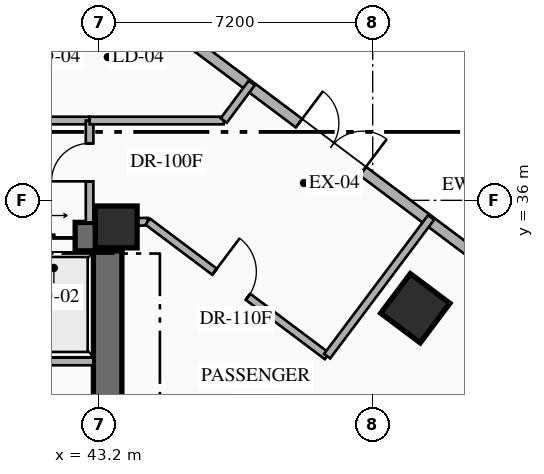
"""IFC4 building model, lengths in metres.
Left out: names, types, materials, properties, quantities, classifications, styles, units other than length and angle.
Written with IfcOpenShell. Run it as: python <this file> out.ifc"""

import sys

from ifc_helpers import new_model, si_unit, direction, frame, frame_2d, origin, origin_2d, place, context, subcontext, project, spatial, rectangle, extrude, element, fill, save


model = new_model("IFC4")
c1 = context("Model", 3, precision=1e-05, world=origin(), true_north=direction((0.0, 1.0)))
c2 = subcontext(c1, "Body", "Model", "MODEL_VIEW")
j1 = project(units=[si_unit("LENGTHUNIT", "METRE"), si_unit("PLANEANGLEUNIT", "RADIAN")], contexts=[c1])
p1 = place(None, origin())
s1 = spatial("IfcSite", under=j1, at=p1, CompositionType="ELEMENT")
p2 = place(p1, origin())
s2 = spatial("IfcBuilding", under=s1, at=p2, CompositionType="ELEMENT")
p3 = place(p2, origin())
s3 = spatial("IfcBuildingStorey", under=s2, at=p3, CompositionType="ELEMENT", Elevation=0.0)
p4 = place(p3, frame((35.74, 35.045, 0.0), z_axis=(0.0, 0.0, 1.0), x_axis=(1.0, 0.0, 0.0)))
e1 = element("IfcWall", 1, at=p4, inside=s3, PredefinedType="SHEAR", context=c2, shape_type="SweptSolid", body=[
    extrude(rectangle(XDim=8.06, YDim=0.75, at=frame_2d((4.03, 0.0))), origin(), (0.0, 0.0, 1.0), 5.4),
])
p5 = place(p4, frame((2.81, 0.0, 0.0)))
e2 = element("IfcOpeningElement", 2, at=p5, cuts=e1, PredefinedType="OPENING", context=c2, shape_type="SweptSolid", body=[
    extrude(rectangle(XDim=1.1, YDim=2.2, at=frame_2d((0.55, 1.1))), frame((0.0, 0.385, 0.0), z_axis=(0.0, -1.0, 0.0), x_axis=(1.0, 0.0, 0.0)), (0.0, 0.0, 1.0), 0.77),
])
p6 = place(p4, frame((5.71, 0.0, 0.0)))
e3 = element("IfcOpeningElement", 3, at=p6, cuts=e1, PredefinedType="OPENING", context=c2, shape_type="SweptSolid", body=[
    extrude(rectangle(XDim=1.12, YDim=2.15, at=frame_2d((0.56, 1.075))), frame((0.0, 0.385, 0.0), z_axis=(0.0, -1.0, 0.0), x_axis=(1.0, 0.0, 0.0)), (0.0, 0.0, 1.0), 0.77),
])
p7 = place(p3, frame((43.425, 25.19, 0.0), z_axis=(0.0, 0.0, 1.0), x_axis=(0.0, 1.0, 0.0)))
e4 = element("IfcWall", 4, at=p7, inside=s3, PredefinedType="SHEAR", context=c2, shape_type="SweptSolid", body=[
    extrude(rectangle(XDim=9.48, YDim=0.75, at=frame_2d((4.74, 0.0))), origin(), (0.0, 0.0, 1.0), 5.4),
])
p8 = place(p7, frame((1.51, 0.0, 0.0)))
e5 = element("IfcOpeningElement", 5, at=p8, cuts=e4, PredefinedType="OPENING", context=c2, shape_type="SweptSolid", body=[
    extrude(rectangle(XDim=0.85, YDim=2.08, at=frame_2d((0.425, 1.04))), frame((0.0, 0.385, 0.0), z_axis=(0.0, -1.0, 0.0), x_axis=(1.0, 0.0, 0.0)), (0.0, 0.0, 1.0), 0.77),
])
p9 = place(p7, frame((4.76, 0.0, 0.0)))
e6 = element("IfcOpeningElement", 6, at=p9, cuts=e4, PredefinedType="OPENING", context=c2, shape_type="SweptSolid", body=[
    extrude(rectangle(XDim=0.85, YDim=2.08, at=frame_2d((0.425, 1.04))), frame((0.0, 0.385, 0.0), z_axis=(0.0, -1.0, 0.0), x_axis=(1.0, 0.0, 0.0)), (0.0, 0.0, 1.0), 0.77),
])
p10 = place(p3, frame((43.65, 35.3, 0.0), z_axis=(0.0, 0.0, 1.0), x_axis=(1.0, 0.0, 0.0)))
e7 = element("IfcColumn", 7, at=p10, inside=s3, PredefinedType="COLUMN", context=c2, shape_type="SweptSolid", body=[
    extrude(rectangle(XDim=1.1, YDim=1.1, at=origin_2d()), origin(), (0.0, 0.0, 1.0), 5.4),
])
p11 = place(p3, frame((51.52, 33.16, 0.0), z_axis=(0.0, 0.0, 1.0), x_axis=(0.799999996291, -0.600000004945, 0.0)))
e8 = element("IfcColumn", 8, at=p11, inside=s3, PredefinedType="COLUMN", context=c2, shape_type="SweptSolid", body=[
    extrude(rectangle(XDim=1.3, YDim=1.3, at=origin_2d()), origin(), (0.0, 0.0, 1.0), 5.4),
])
p12 = place(p3, frame((44.86, 40.73, 0.0), z_axis=(0.0, 0.0, 1.0), x_axis=(0.800006570398, -0.599991239369, 0.0)))
e9 = element("IfcWall", 9, at=p12, inside=s3, PredefinedType="STANDARD", context=c2, shape_type="SweptSolid", body=[
    extrude(rectangle(XDim=31.212, YDim=0.28, at=frame_2d((15.606, 0.0))), origin(), (0.0, 0.0, 1.0), 5.1),
])
p13 = place(p12, frame((4.5, 0.0, 0.0)))
e10 = element("IfcOpeningElement", 10, at=p13, cuts=e9, PredefinedType="OPENING", context=c2, shape_type="SweptSolid", body=[
    extrude(rectangle(XDim=2.1, YDim=2.3, at=frame_2d((1.05, 1.15))), frame((0.0, 0.15, 0.0), z_axis=(0.0, -1.0, 0.0), x_axis=(1.0, 0.0, 0.0)), (0.0, 0.0, 1.0), 0.3),
])
p14 = place(p12, frame((13.932, 0.0, 0.0)))
e11 = element("IfcOpeningElement", 11, at=p14, cuts=e9, PredefinedType="OPENING", context=c2, shape_type="SweptSolid", body=[
    extrude(rectangle(XDim=2.1, YDim=2.3, at=frame_2d((1.05, 1.15))), frame((0.0, 0.15, 0.0), z_axis=(0.0, -1.0, 0.0), x_axis=(1.0, 0.0, 0.0)), (0.0, 0.0, 1.0), 0.3),
])
p15 = place(p12, frame((21.423, 0.0, 0.0)))
e12 = element("IfcOpeningElement", 12, at=p15, cuts=e9, PredefinedType="OPENING", context=c2, shape_type="SweptSolid", body=[
    extrude(rectangle(XDim=2.1, YDim=2.3, at=frame_2d((1.05, 1.15))), frame((0.0, 0.15, 0.0), z_axis=(0.0, -1.0, 0.0), x_axis=(1.0, 0.0, 0.0)), (0.0, 0.0, 1.0), 0.3),
])
p16 = place(p12, frame((25.168, 0.0, 0.0)))
e13 = element("IfcOpeningElement", 13, at=p16, cuts=e9, PredefinedType="OPENING", context=c2, shape_type="SweptSolid", body=[
    extrude(rectangle(XDim=2.1, YDim=2.3, at=frame_2d((1.05, 1.15))), frame((0.0, 0.15, 0.0), z_axis=(0.0, -1.0, 0.0), x_axis=(1.0, 0.0, 0.0)), (0.0, 0.0, 1.0), 0.3),
])
p17 = place(p3, frame((40.97, 31.76, 0.0), z_axis=(0.0, 0.0, 1.0), x_axis=(1.0, 0.0, 0.0)))
e14 = element("IfcWall", 14, at=p17, inside=s3, PredefinedType="STANDARD", context=c2, shape_type="SweptSolid", body=[
    extrude(rectangle(XDim=2.08, YDim=0.2, at=frame_2d((1.04, 0.0))), origin(), (0.0, 0.0, 1.0), 5.1),
])
p18 = place(p3, frame((37.65, 38.1, 0.0), z_axis=(0.0, 0.0, 1.0), x_axis=(1.0, 0.0, 0.0)))
e15 = element("IfcWall", 15, at=p18, inside=s3, PredefinedType="STANDARD", context=c2, shape_type="SweptSolid", body=[
    extrude(rectangle(XDim=5.3, YDim=0.2, at=frame_2d((2.65, 0.0))), origin(), (0.0, 0.0, 1.0), 5.1),
])
p19 = place(p3, frame((42.95, 35.42, 0.0), z_axis=(0.0, 0.0, 1.0), x_axis=(0.0, 1.0, 0.0)))
e16 = element("IfcWall", 16, at=p19, inside=s3, PredefinedType="STANDARD", context=c2, shape_type="SweptSolid", body=[
    extrude(rectangle(XDim=2.68, YDim=0.2, at=frame_2d((1.34, 0.0))), origin(), (0.0, 0.0, 1.0), 5.1),
])
p20 = place(p19, frame((1.08, 0.0, 0.0)))
e17 = element("IfcOpeningElement", 17, at=p20, cuts=e16, PredefinedType="OPENING", context=c2, shape_type="SweptSolid", body=[
    extrude(rectangle(XDim=1.0, YDim=2.2, at=frame_2d((0.5, 1.1))), frame((0.0, 0.11, 0.0), z_axis=(0.0, -1.0, 0.0), x_axis=(1.0, 0.0, 0.0)), (0.0, 0.0, 1.0), 0.22),
])
p21 = place(p3, frame((42.95, 38.1, 0.0), z_axis=(0.0, 0.0, 1.0), x_axis=(1.0, 0.0, 0.0)))
e18 = element("IfcWall", 18, at=p21, inside=s3, PredefinedType="STANDARD", context=c2, shape_type="SweptSolid", body=[
    extrude(rectangle(XDim=3.53, YDim=0.2, at=frame_2d((1.765, 0.0))), origin(), (0.0, 0.0, 1.0), 5.1),
])
p22 = place(p3, frame((46.48, 38.1, 0.0), z_axis=(0.0, 0.0, 1.0), x_axis=(0.597523800128, 0.801851175893, 0.0)))
e19 = element("IfcWall", 19, at=p22, inside=s3, PredefinedType="STANDARD", context=c2, shape_type="SweptSolid", body=[
    extrude(rectangle(XDim=1.232, YDim=0.2, at=frame_2d((0.616, 0.0))), origin(), (0.0, 0.0, 1.0), 5.1),
])
p23 = place(p3, frame((43.8, 35.42, 0.0), z_axis=(0.0, 0.0, 1.0), x_axis=(0.999566823339, 0.029430692824, 0.0)))
e20 = element("IfcWall", 20, at=p23, inside=s3, PredefinedType="STANDARD", context=c2, shape_type="SweptSolid", body=[
    extrude(rectangle(XDim=0.68, YDim=0.2, at=frame_2d((0.34, 0.0))), origin(), (0.0, 0.0, 1.0), 5.1),
])
p24 = place(p3, frame((44.48, 35.44, 0.0), z_axis=(0.0, 0.0, 1.0), x_axis=(0.799995034401, -0.600006620742, 0.0)))
e21 = element("IfcWall", 21, at=p24, inside=s3, PredefinedType="STANDARD", context=c2, shape_type="SweptSolid", body=[
    extrude(rectangle(XDim=5.9, YDim=0.2, at=frame_2d((2.95, 0.0))), origin(), (0.0, 0.0, 1.0), 4.495),
])
p25 = place(p24, frame((2.198, 0.0, 0.0)))
e22 = element("IfcOpeningElement", 22, at=p25, cuts=e21, PredefinedType="OPENING", context=c2, shape_type="SweptSolid", body=[
    extrude(rectangle(XDim=1.1, YDim=2.24, at=frame_2d((0.55, 1.12))), frame((0.0, 0.11, 0.0), z_axis=(0.0, -1.0, 0.0), x_axis=(1.0, 0.0, 0.0)), (0.0, 0.0, 1.0), 0.22),
])
p26 = place(p3, frame((49.2, 31.9, 0.0), z_axis=(0.0, 0.0, 1.0), x_axis=(0.599991434013, 0.800006424419, 0.0)))
e23 = element("IfcWall", 23, at=p26, inside=s3, PredefinedType="STANDARD", context=c2, shape_type="SweptSolid", body=[
    extrude(rectangle(XDim=4.56, YDim=0.2, at=frame_2d((2.28, 0.0))), origin(), (0.0, 0.0, 1.0), 5.1),
])
p27 = place(p3, frame((47.12, 22.96, 0.0), z_axis=(0.0, 0.0, 1.0), x_axis=(0.599996985882, 0.80000226058, 0.0)))
e24 = element("IfcWall", 24, at=p27, inside=s3, PredefinedType="PARTITIONING", context=c2, shape_type="SweptSolid", body=[
    extrude(rectangle(XDim=12.96, YDim=0.15, at=frame_2d((6.48, 0.0))), origin(), (0.0, 0.0, 1.0), 5.1),
])
p28 = place(p27, frame((6.485, 0.0, 0.0)))
e25 = element("IfcOpeningElement", 25, at=p28, cuts=e24, PredefinedType="OPENING", context=c2, shape_type="SweptSolid", body=[
    extrude(rectangle(XDim=1.1, YDim=2.16, at=frame_2d((0.55, 1.08))), frame((0.0, 0.085, 0.0), z_axis=(0.0, -1.0, 0.0), x_axis=(1.0, 0.0, 0.0)), (0.0, 0.0, 1.0), 0.17),
])
p29 = place(p13, origin())
e26 = element("IfcDoor", 26, at=p29, inside=s3, OperationType="DOUBLE_SWING_LEFT", PredefinedType="DOOR", context=c2, shape_type="SweptSolid", body=[
    extrude(rectangle(XDim=2.1, YDim=2.3, at=frame_2d((1.05, 1.15))), frame((0.0, 0.025, 0.0), z_axis=(0.0, -1.0, 0.0), x_axis=(1.0, 0.0, 0.0)), (0.0, 0.0, 1.0), 0.05),
])
fill(e10, e26)
p30 = place(p6, origin())
e27 = element("IfcDoor", 27, at=p30, inside=s3, OperationType="SLIDING_TO_RIGHT", PredefinedType="USERDEFINED", context=c2, shape_type="SweptSolid", body=[
    extrude(rectangle(XDim=1.12, YDim=2.15, at=frame_2d((0.56, 1.075))), frame((0.0, 0.025, 0.0), z_axis=(0.0, -1.0, 0.0), x_axis=(1.0, 0.0, 0.0)), (0.0, 0.0, 1.0), 0.05),
])
fill(e3, e27)
p31 = place(p20, origin())
e28 = element("IfcDoor", 28, at=p31, inside=s3, OperationType="SINGLE_SWING_LEFT", PredefinedType="DOOR", context=c2, shape_type="SweptSolid", body=[
    extrude(rectangle(XDim=1.0, YDim=2.2, at=frame_2d((0.5, 1.1))), frame((0.0, 0.025, 0.0), z_axis=(0.0, -1.0, 0.0), x_axis=(1.0, 0.0, 0.0)), (0.0, 0.0, 1.0), 0.05),
])
fill(e17, e28)
p32 = place(p25, origin())
e29 = element("IfcDoor", 29, at=p32, inside=s3, OperationType="SINGLE_SWING_LEFT", PredefinedType="DOOR", context=c2, shape_type="SweptSolid", body=[
    extrude(rectangle(XDim=1.1, YDim=2.24, at=frame_2d((0.55, 1.12))), frame((0.0, 0.025, 0.0), z_axis=(0.0, -1.0, 0.0), x_axis=(1.0, 0.0, 0.0)), (0.0, 0.0, 1.0), 0.05),
])
fill(e22, e29)
save(model, sys.argv[1])
